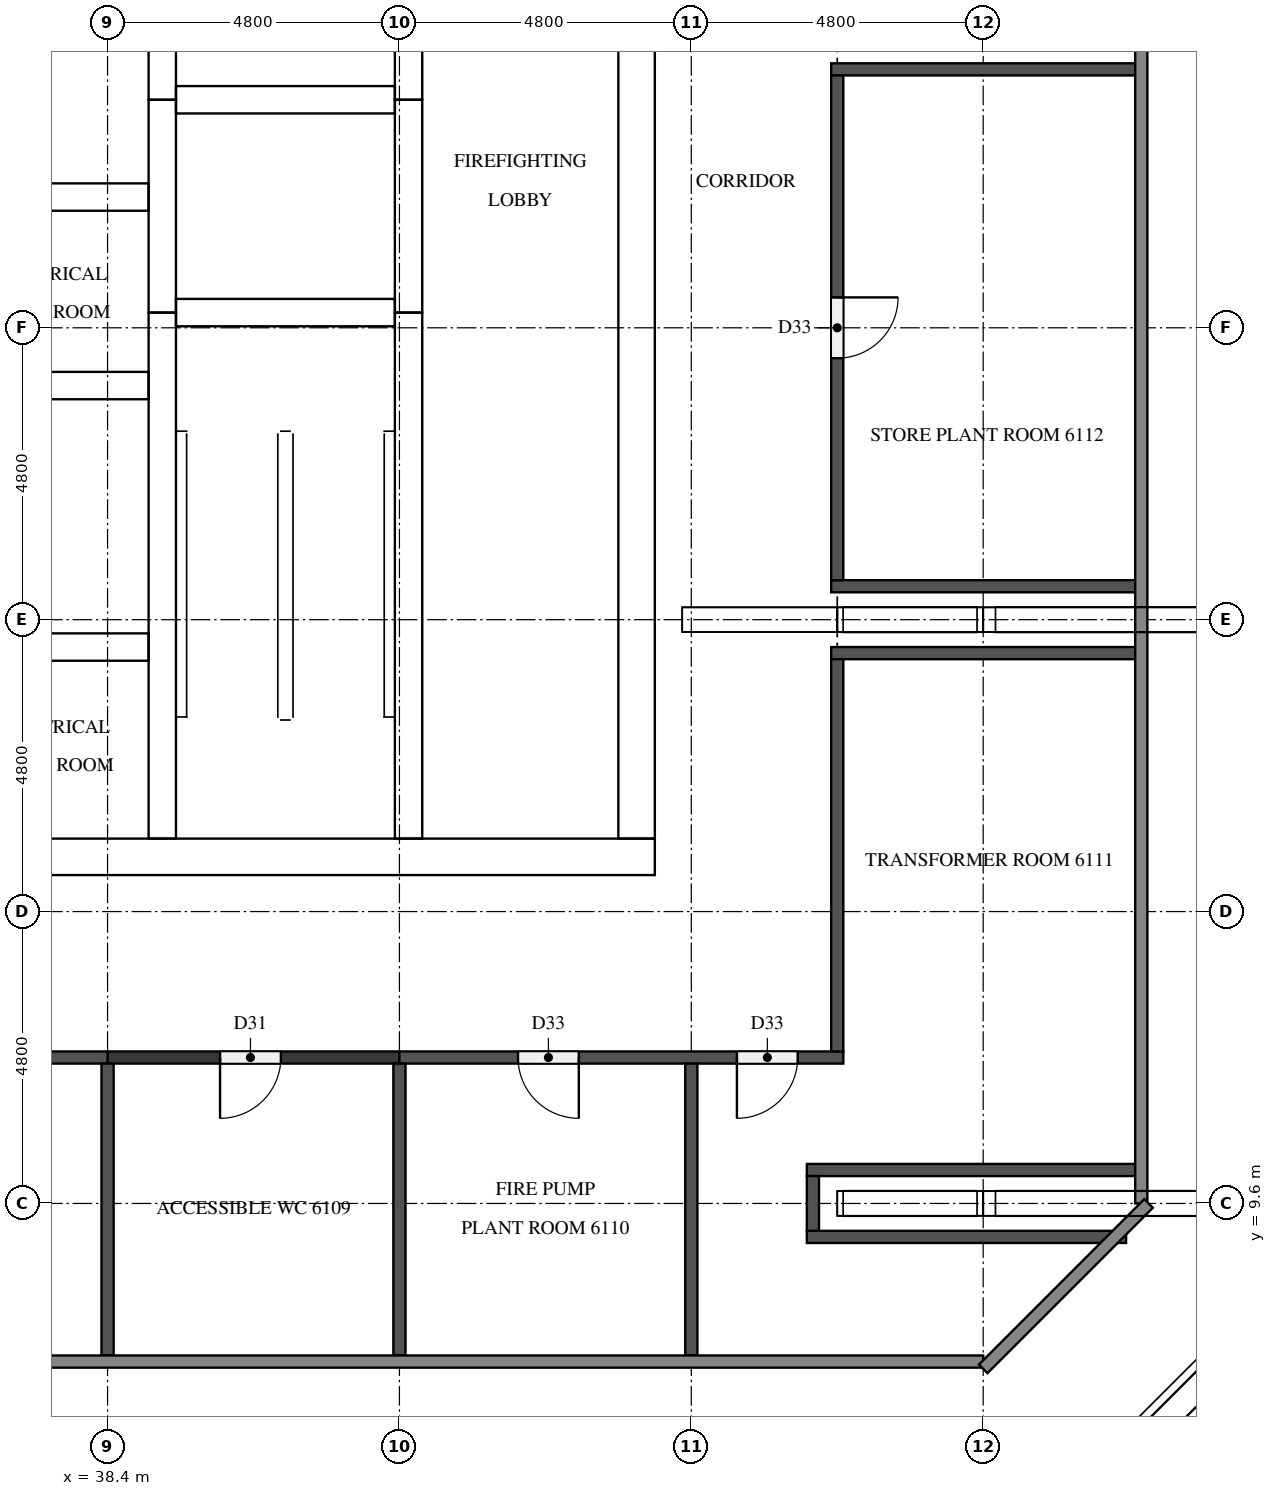
"""IFC4 building model, lengths in metres.
Left out: names, types, materials, properties, quantities, classifications, styles, units other than length and angle.
Written with IfcOpenShell. Run it as: python <this file> out.ifc"""

import sys

from ifc_helpers import new_model, si_unit, direction, frame, frame_2d, origin, place, context, subcontext, project, spatial, rectangle, extrude, element, fill, save


model = new_model("IFC4")
c1 = context("Model", 3, precision=1e-05, world=origin(), true_north=direction((0.0, 1.0)))
c2 = subcontext(c1, "Body", "Model", "MODEL_VIEW")
j1 = project(units=[si_unit("LENGTHUNIT", "METRE"), si_unit("PLANEANGLEUNIT", "RADIAN")], contexts=[c1])
p1 = place(None, origin())
s1 = spatial("IfcSite", under=j1, at=p1, CompositionType="ELEMENT")
p2 = place(p1, origin())
s2 = spatial("IfcBuilding", under=s1, at=p2, CompositionType="ELEMENT")
p3 = place(p2, frame((0.0, 0.0, 233.3)))
s3 = spatial("IfcBuildingStorey", under=s2, at=p3, CompositionType="ELEMENT", Elevation=233.3)
p4 = place(p3, frame((15.0, 15.3, 0.0), z_axis=(0.0, 0.0, 1.0), x_axis=(1.0, 0.0, 0.0)))
e1 = element("IfcWall", 1, at=p4, inside=s3, PredefinedType="SHEAR", context=c2, shape_type="SweptSolid", body=[
    extrude(rectangle(XDim=32.4, YDim=0.6, at=frame_2d((16.2, 0.0))), origin(), (0.0, 0.0, 1.0), 5.1),
])
p5 = place(p4, frame((15.3, 0.0, 0.0)))
e2 = element("IfcOpeningElement", 2, at=p5, cuts=e1, PredefinedType="OPENING", context=c2, shape_type="SweptSolid", body=[
    extrude(rectangle(XDim=1.8, YDim=2.1, at=frame_2d((0.9, 1.05))), frame((0.0, 0.31, 0.0), z_axis=(0.0, -1.0, 0.0), x_axis=(1.0, 0.0, 0.0)), (0.0, 0.0, 1.0), 0.62),
])
p6 = place(p3, frame((47.1, 15.6, 0.0), z_axis=(0.0, 0.0, 1.0), x_axis=(0.0, 1.0, 0.0)))
e3 = element("IfcWall", 3, at=p6, inside=s3, PredefinedType="SHEAR", context=c2, shape_type="SweptSolid", body=[
    extrude(rectangle(XDim=21.6, YDim=0.6, at=frame_2d((10.8, 0.0))), origin(), (0.0, 0.0, 1.0), 5.1),
])
p7 = place(p6, frame((10.5, 0.0, 0.0)))
e4 = element("IfcOpeningElement", 4, at=p7, cuts=e3, PredefinedType="OPENING", context=c2, shape_type="SweptSolid", body=[
    extrude(rectangle(XDim=1.2, YDim=2.1, at=frame_2d((0.6, 1.05))), frame((0.0, 0.31, 0.0), z_axis=(0.0, -1.0, 0.0), x_axis=(1.0, 0.0, 0.0)), (0.0, 0.0, 1.0), 0.62),
])
p8 = place(p3, frame((39.3, 15.6, 0.0), z_axis=(0.0, 0.0, 1.0), x_axis=(0.0, 1.0, 0.0)))
e5 = element("IfcWall", 5, at=p8, inside=s3, PredefinedType="SHEAR", context=c2, shape_type="SweptSolid", body=[
    extrude(rectangle(XDim=8.65, YDim=0.45, at=frame_2d((4.325, 0.0))), origin(), (0.0, 0.0, 1.0), 5.1),
])
p9 = place(p3, frame((39.3, 24.25, 0.0), z_axis=(0.0, 0.0, 1.0), x_axis=(0.0, 1.0, 0.0)))
e6 = element("IfcWall", 6, at=p9, inside=s3, PredefinedType="SHEAR", context=c2, shape_type="SweptSolid", body=[
    extrude(rectangle(XDim=3.5, YDim=0.45, at=frame_2d((1.75, 0.0))), origin(), (0.0, 0.0, 1.0), 5.1),
])
p10 = place(p3, frame((39.3, 27.75, 0.0), z_axis=(0.0, 0.0, 1.0), x_axis=(0.0, 1.0, 0.0)))
e7 = element("IfcWall", 7, at=p10, inside=s3, PredefinedType="SHEAR", context=c2, shape_type="SweptSolid", body=[
    extrude(rectangle(XDim=9.45, YDim=0.45, at=frame_2d((4.725, 0.0))), origin(), (0.0, 0.0, 1.0), 5.1),
])
p11 = place(p3, frame((43.35, 15.6, 0.0), z_axis=(0.0, 0.0, 1.0), x_axis=(0.0, 1.0, 0.0)))
e8 = element("IfcWall", 8, at=p11, inside=s3, PredefinedType="SHEAR", context=c2, shape_type="SweptSolid", body=[
    extrude(rectangle(XDim=8.65, YDim=0.45, at=frame_2d((4.325, 0.0))), origin(), (0.0, 0.0, 1.0), 5.1),
])
p12 = place(p11, frame((0.6, 0.0, 0.0)))
e9 = element("IfcOpeningElement", 9, at=p12, cuts=e8, PredefinedType="OPENING", context=c2, shape_type="SweptSolid", body=[
    extrude(rectangle(XDim=1.2, YDim=2.1, at=frame_2d((0.6, 1.05))), frame((0.0, 0.235, 0.0), z_axis=(0.0, -1.0, 0.0), x_axis=(1.0, 0.0, 0.0)), (0.0, 0.0, 1.0), 0.47),
])
p13 = place(p3, frame((43.35, 24.25, 0.0), z_axis=(0.0, 0.0, 1.0), x_axis=(0.0, 1.0, 0.0)))
e10 = element("IfcWall", 10, at=p13, inside=s3, PredefinedType="SHEAR", context=c2, shape_type="SweptSolid", body=[
    extrude(rectangle(XDim=3.5, YDim=0.45, at=frame_2d((1.75, 0.0))), origin(), (0.0, 0.0, 1.0), 5.1),
])
p14 = place(p13, frame((1.2, 0.0, 0.0)))
e11 = element("IfcOpeningElement", 11, at=p14, cuts=e10, PredefinedType="OPENING", context=c2, shape_type="SweptSolid", body=[
    extrude(rectangle(XDim=1.1, YDim=2.1, at=frame_2d((0.55, 1.05))), frame((0.0, 0.235, 0.0), z_axis=(0.0, -1.0, 0.0), x_axis=(1.0, 0.0, 0.0)), (0.0, 0.0, 1.0), 0.47),
])
p15 = place(p3, frame((43.35, 27.75, 0.0), z_axis=(0.0, 0.0, 1.0), x_axis=(0.0, 1.0, 0.0)))
e12 = element("IfcWall", 12, at=p15, inside=s3, PredefinedType="SHEAR", context=c2, shape_type="SweptSolid", body=[
    extrude(rectangle(XDim=9.45, YDim=0.45, at=frame_2d((4.725, 0.0))), origin(), (0.0, 0.0, 1.0), 5.1),
])
p16 = place(p15, frame((7.65, 0.0, 0.0)))
e13 = element("IfcOpeningElement", 13, at=p16, cuts=e12, PredefinedType="OPENING", context=c2, shape_type="SweptSolid", body=[
    extrude(rectangle(XDim=1.2, YDim=2.1, at=frame_2d((0.6, 1.05))), frame((0.0, 0.235, 0.0), z_axis=(0.0, -1.0, 0.0), x_axis=(1.0, 0.0, 0.0)), (0.0, 0.0, 1.0), 0.47),
])
for number, where, z_axis, x_axis in (
    (14, (39.525, 24.25, 0.0), (0.0, 0.0, 1.0), (1.0, 0.0, 0.0)),
    (15, (39.525, 27.75, 0.0), (0.0, 0.0, 1.0), (1.0, 0.0, 0.0)),
):
    element("IfcWall", number, at=place(p3, frame(where, z_axis=z_axis, x_axis=x_axis)), inside=s3, PredefinedType="SHEAR", context=c2, shape_type="SweptSolid", body=[
        extrude(rectangle(XDim=3.6, YDim=0.45, at=frame_2d((1.8, 0.0))), origin(), (0.0, 0.0, 1.0), 5.1),
    ])
p17 = place(p3, frame((33.475, 18.75, 0.0), z_axis=(0.0, 0.0, 1.0), x_axis=(1.0, 0.0, 0.0)))
e16 = element("IfcWall", 16, at=p17, inside=s3, PredefinedType="SHEAR", context=c2, shape_type="SweptSolid", body=[
    extrude(rectangle(XDim=5.6, YDim=0.45, at=frame_2d((2.8, 0.0))), origin(), (0.0, 0.0, 1.0), 5.1),
])
p18 = place(p17, frame((0.853, 0.0, 0.0)))
e17 = element("IfcOpeningElement", 17, at=p18, cuts=e16, PredefinedType="OPENING", context=c2, shape_type="SweptSolid", body=[
    extrude(rectangle(XDim=1.0, YDim=2.1, at=frame_2d((0.5, 1.05))), frame((0.0, 0.235, 0.0), z_axis=(0.0, -1.0, 0.0), x_axis=(1.0, 0.0, 0.0)), (0.0, 0.0, 1.0), 0.47),
])
p19 = place(p17, frame((3.528, 0.0, 0.0)))
e18 = element("IfcOpeningElement", 18, at=p19, cuts=e16, PredefinedType="OPENING", context=c2, shape_type="SweptSolid", body=[
    extrude(rectangle(XDim=1.0, YDim=2.1, at=frame_2d((0.5, 1.05))), frame((0.0, 0.235, 0.0), z_axis=(0.0, -1.0, 0.0), x_axis=(1.0, 0.0, 0.0)), (0.0, 0.0, 1.0), 0.47),
])
p20 = place(p3, frame((23.325, 23.05, 0.0), z_axis=(0.0, 0.0, 1.0), x_axis=(1.0, 0.0, 0.0)))
e19 = element("IfcWall", 19, at=p20, inside=s3, PredefinedType="SHEAR", context=c2, shape_type="SweptSolid", body=[
    extrude(rectangle(XDim=15.75, YDim=0.45, at=frame_2d((7.875, 0.0))), origin(), (0.0, 0.0, 1.0), 5.1),
])
p21 = place(p20, frame((0.32, 0.0, 0.0)))
e20 = element("IfcOpeningElement", 20, at=p21, cuts=e19, PredefinedType="OPENING", context=c2, shape_type="SweptSolid", body=[
    extrude(rectangle(XDim=1.0, YDim=2.1, at=frame_2d((0.5, 1.05))), frame((0.0, 0.235, 0.0), z_axis=(0.0, -1.0, 0.0), x_axis=(1.0, 0.0, 0.0)), (0.0, 0.0, 1.0), 0.47),
])
p22 = place(p20, frame((2.978, 0.0, 0.0)))
e21 = element("IfcOpeningElement", 21, at=p22, cuts=e19, PredefinedType="OPENING", context=c2, shape_type="SweptSolid", body=[
    extrude(rectangle(XDim=1.0, YDim=2.1, at=frame_2d((0.5, 1.05))), frame((0.0, 0.235, 0.0), z_axis=(0.0, -1.0, 0.0), x_axis=(1.0, 0.0, 0.0)), (0.0, 0.0, 1.0), 0.47),
])
p23 = place(p20, frame((10.953, 0.0, 0.0)))
e22 = element("IfcOpeningElement", 22, at=p23, cuts=e19, PredefinedType="OPENING", context=c2, shape_type="SweptSolid", body=[
    extrude(rectangle(XDim=1.0, YDim=2.1, at=frame_2d((0.5, 1.05))), frame((0.0, 0.235, 0.0), z_axis=(0.0, -1.0, 0.0), x_axis=(1.0, 0.0, 0.0)), (0.0, 0.0, 1.0), 0.47),
])
p24 = place(p20, frame((13.612, 0.0, 0.0)))
e23 = element("IfcOpeningElement", 23, at=p24, cuts=e19, PredefinedType="OPENING", context=c2, shape_type="SweptSolid", body=[
    extrude(rectangle(XDim=1.0, YDim=2.1, at=frame_2d((0.5, 1.05))), frame((0.0, 0.235, 0.0), z_axis=(0.0, -1.0, 0.0), x_axis=(1.0, 0.0, 0.0)), (0.0, 0.0, 1.0), 0.47),
])
p25 = place(p3, frame((23.325, 26.15, 0.0), z_axis=(0.0, 0.0, 1.0), x_axis=(1.0, 0.0, 0.0)))
e24 = element("IfcWall", 24, at=p25, inside=s3, PredefinedType="SHEAR", context=c2, shape_type="SweptSolid", body=[
    extrude(rectangle(XDim=15.75, YDim=0.45, at=frame_2d((7.875, 0.0))), origin(), (0.0, 0.0, 1.0), 5.1),
])
p26 = place(p3, frame((49.9, 9.05, 0.0), z_axis=(0.0, 0.0, 1.0), x_axis=(1.0, 0.0, 0.0)))
e25 = element("IfcWall", 25, at=p26, inside=s3, PredefinedType="PARTITIONING", context=c2, shape_type="SweptSolid", body=[
    extrude(rectangle(XDim=5.25, YDim=0.2, at=frame_2d((2.625, 0.0))), origin(), (0.0, 0.0, 1.0), 5.1),
])
p27 = place(p3, frame((49.9, 10.15, 0.0), z_axis=(0.0, 0.0, 1.0), x_axis=(1.0, 0.0, 0.0)))
e26 = element("IfcWall", 26, at=p27, inside=s3, PredefinedType="PARTITIONING", context=c2, shape_type="SweptSolid", body=[
    extrude(rectangle(XDim=5.4, YDim=0.2, at=frame_2d((2.7, 0.0))), origin(), (0.0, 0.0, 1.0), 5.1),
])
p28 = place(p3, frame((43.2, 12.0, 0.0), z_axis=(0.0, 0.0, 1.0), x_axis=(-1.0, 0.0, 0.0)))
e27 = element("IfcWall", 27, at=p28, inside=s3, PredefinedType="PARTITIONING", context=c2, shape_type="SweptSolid", body=[
    extrude(rectangle(XDim=4.8, YDim=0.2, at=frame_2d((2.4, 0.0))), origin(), (0.0, 0.0, 1.0), 5.1),
])
p29 = place(p28, frame((1.95, 0.0, 0.0)))
e28 = element("IfcOpeningElement", 28, at=p29, cuts=e27, PredefinedType="OPENING", context=c2, shape_type="SweptSolid", body=[
    extrude(rectangle(XDim=1.0, YDim=2.1, at=frame_2d((0.5, 1.05))), frame((0.0, 0.11, 0.0), z_axis=(0.0, -1.0, 0.0), x_axis=(1.0, 0.0, 0.0)), (0.0, 0.0, 1.0), 0.22),
])
p30 = place(p3, frame((38.4, 12.0, 0.0), z_axis=(0.0, 0.0, 1.0), x_axis=(-1.0, 0.0, 0.0)))
e29 = element("IfcWall", 29, at=p30, inside=s3, PredefinedType="PARTITIONING", context=c2, shape_type="SweptSolid", body=[
    extrude(rectangle(XDim=26.5, YDim=0.2, at=frame_2d((13.25, 0.0))), origin(), (0.0, 0.0, 1.0), 5.1),
])
p31 = place(p30, frame((24.75, 0.0, 0.0)))
e30 = element("IfcOpeningElement", 30, at=p31, cuts=e29, PredefinedType="OPENING", context=c2, shape_type="SweptSolid", body=[
    extrude(rectangle(XDim=1.0, YDim=2.1, at=frame_2d((0.5, 1.05))), frame((0.0, 0.11, 0.0), z_axis=(0.0, -1.0, 0.0), x_axis=(1.0, 0.0, 0.0)), (0.0, 0.0, 1.0), 0.22),
])
p32 = place(p30, frame((21.05, 0.0, 0.0)))
e31 = element("IfcOpeningElement", 31, at=p32, cuts=e29, PredefinedType="OPENING", context=c2, shape_type="SweptSolid", body=[
    extrude(rectangle(XDim=1.0, YDim=2.1, at=frame_2d((0.5, 1.05))), frame((0.0, 0.11, 0.0), z_axis=(0.0, -1.0, 0.0), x_axis=(1.0, 0.0, 0.0)), (0.0, 0.0, 1.0), 0.22),
])
p33 = place(p30, frame((13.95, 0.0, 0.0)))
e32 = element("IfcOpeningElement", 32, at=p33, cuts=e29, PredefinedType="OPENING", context=c2, shape_type="SweptSolid", body=[
    extrude(rectangle(XDim=1.0, YDim=2.1, at=frame_2d((0.5, 1.05))), frame((0.0, 0.11, 0.0), z_axis=(0.0, -1.0, 0.0), x_axis=(1.0, 0.0, 0.0)), (0.0, 0.0, 1.0), 0.22),
])
p34 = place(p30, frame((4.25, 0.0, 0.0)))
e33 = element("IfcOpeningElement", 33, at=p34, cuts=e29, PredefinedType="OPENING", context=c2, shape_type="SweptSolid", body=[
    extrude(rectangle(XDim=1.0, YDim=2.1, at=frame_2d((0.5, 1.05))), frame((0.0, 0.11, 0.0), z_axis=(0.0, -1.0, 0.0), x_axis=(1.0, 0.0, 0.0)), (0.0, 0.0, 1.0), 0.22),
])
p35 = place(p3, frame((50.5, 12.0, 0.0), z_axis=(0.0, 0.0, 1.0), x_axis=(-1.0, 0.0, 0.0)))
e34 = element("IfcWall", 34, at=p35, inside=s3, PredefinedType="PARTITIONING", context=c2, shape_type="SweptSolid", body=[
    extrude(rectangle(XDim=7.3, YDim=0.2, at=frame_2d((3.65, 0.0))), origin(), (0.0, 0.0, 1.0), 5.1),
])
p36 = place(p35, frame((4.35, 0.0, 0.0)))
e35 = element("IfcOpeningElement", 35, at=p36, cuts=e34, PredefinedType="OPENING", context=c2, shape_type="SweptSolid", body=[
    extrude(rectangle(XDim=1.0, YDim=2.1, at=frame_2d((0.5, 1.05))), frame((0.0, 0.11, 0.0), z_axis=(0.0, -1.0, 0.0), x_axis=(1.0, 0.0, 0.0)), (0.0, 0.0, 1.0), 0.22),
])
p37 = place(p35, frame((0.75, 0.0, 0.0)))
e36 = element("IfcOpeningElement", 36, at=p37, cuts=e34, PredefinedType="OPENING", context=c2, shape_type="SweptSolid", body=[
    extrude(rectangle(XDim=1.0, YDim=2.1, at=frame_2d((0.5, 1.05))), frame((0.0, 0.11, 0.0), z_axis=(0.0, -1.0, 0.0), x_axis=(1.0, 0.0, 0.0)), (0.0, 0.0, 1.0), 0.22),
])
for number, where, z_axis, x_axis in (
    (37, (50.3, 18.65, 0.0), (0.0, 0.0, 1.0), (1.0, 0.0, 0.0)),
    (38, (50.3, 19.75, 0.0), (0.0, 0.0, 1.0), (1.0, 0.0, 0.0)),
    (39, (50.3, 28.25, 0.0), (0.0, 0.0, 1.0), (1.0, 0.0, 0.0)),
):
    element("IfcWall", number, at=place(p3, frame(where, z_axis=z_axis, x_axis=x_axis)), inside=s3, PredefinedType="PARTITIONING", context=c2, shape_type="SweptSolid", body=[
        extrude(rectangle(XDim=5.0, YDim=0.2, at=frame_2d((2.5, 0.0))), origin(), (0.0, 0.0, 1.0), 5.1),
    ])
for number, where, z_axis, x_axis in (
    (40, (38.4, 7.1, 0.0), (0.0, 0.0, 1.0), (0.0, 1.0, 0.0)),
    (41, (43.2, 7.1, 0.0), (0.0, 0.0, 1.0), (0.0, 1.0, 0.0)),
    (42, (48.0, 7.1, 0.0), (0.0, 0.0, 1.0), (0.0, 1.0, 0.0)),
):
    element("IfcWall", number, at=place(p3, frame(where, z_axis=z_axis, x_axis=x_axis)), inside=s3, PredefinedType="PARTITIONING", context=c2, shape_type="SweptSolid", body=[
        extrude(rectangle(XDim=4.8, YDim=0.2, at=frame_2d((2.4, 0.0))), origin(), (0.0, 0.0, 1.0), 5.1),
    ])
p38 = place(p3, frame((50.0, 9.15, 0.0), z_axis=(0.0, 0.0, 1.0), x_axis=(0.0, 1.0, 0.0)))
e43 = element("IfcWall", 43, at=p38, inside=s3, PredefinedType="PARTITIONING", context=c2, shape_type="SweptSolid", body=[
    extrude(rectangle(XDim=0.9, YDim=0.2, at=frame_2d((0.45, 0.0))), origin(), (0.0, 0.0, 1.0), 5.1),
])
p39 = place(p3, frame((50.4, 12.1, 0.0), z_axis=(0.0, 0.0, 1.0), x_axis=(0.0, 1.0, 0.0)))
e44 = element("IfcWall", 44, at=p39, inside=s3, PredefinedType="PARTITIONING", context=c2, shape_type="SweptSolid", body=[
    extrude(rectangle(XDim=6.45, YDim=0.2, at=frame_2d((3.225, 0.0))), origin(), (0.0, 0.0, 1.0), 5.1),
])
p40 = place(p3, frame((50.4, 28.15, 0.0), z_axis=(0.0, 0.0, 1.0), x_axis=(0.0, -1.0, 0.0)))
e45 = element("IfcWall", 45, at=p40, inside=s3, PredefinedType="PARTITIONING", context=c2, shape_type="SweptSolid", body=[
    extrude(rectangle(XDim=8.3, YDim=0.2, at=frame_2d((4.15, 0.0))), origin(), (0.0, 0.0, 1.0), 5.1),
])
p41 = place(p40, frame((3.65, 0.0, 0.0)))
e46 = element("IfcOpeningElement", 46, at=p41, cuts=e45, PredefinedType="OPENING", context=c2, shape_type="SweptSolid", body=[
    extrude(rectangle(XDim=1.0, YDim=2.1, at=frame_2d((0.5, 1.05))), frame((0.0, 0.11, 0.0), z_axis=(0.0, -1.0, 0.0), x_axis=(1.0, 0.0, 0.0)), (0.0, 0.0, 1.0), 0.22),
])
p42 = place(p14, origin())
e47 = element("IfcDoor", 47, at=p42, inside=s3, OperationType="DOUBLE_DOOR_SLIDING", PredefinedType="DOOR", context=c2, shape_type="SweptSolid", body=[
    extrude(rectangle(XDim=1.1, YDim=2.1, at=frame_2d((0.55, 1.05))), frame((0.0, 0.025, 0.0), z_axis=(0.0, -1.0, 0.0), x_axis=(1.0, 0.0, 0.0)), (0.0, 0.0, 1.0), 0.05),
])
fill(e11, e47)
p43 = place(p12, origin())
e48 = element("IfcDoor", 48, at=p43, inside=s3, OperationType="SINGLE_SWING_RIGHT", PredefinedType="DOOR", context=c2, shape_type="SweptSolid", body=[
    extrude(rectangle(XDim=1.2, YDim=2.1, at=frame_2d((0.6, 1.05))), frame((0.0, 0.025, 0.0), z_axis=(0.0, -1.0, 0.0), x_axis=(1.0, 0.0, 0.0)), (0.0, 0.0, 1.0), 0.05),
])
fill(e9, e48)
p44 = place(p7, origin())
e49 = element("IfcDoor", 49, at=p44, inside=s3, OperationType="SINGLE_SWING_LEFT", PredefinedType="DOOR", context=c2, shape_type="SweptSolid", body=[
    extrude(rectangle(XDim=1.2, YDim=2.1, at=frame_2d((0.6, 1.05))), frame((0.0, 0.025, 0.0), z_axis=(0.0, -1.0, 0.0), x_axis=(1.0, 0.0, 0.0)), (0.0, 0.0, 1.0), 0.05),
])
fill(e4, e49)
p45 = place(p24, frame((1.0, 0.0, 0.0), z_axis=(0.0, 0.0, 1.0), x_axis=(-1.0, 0.0, 0.0)))
e50 = element("IfcDoor", 50, at=p45, inside=s3, OperationType="SINGLE_SWING_LEFT", PredefinedType="DOOR", context=c2, shape_type="SweptSolid", body=[
    extrude(rectangle(XDim=1.0, YDim=2.1, at=frame_2d((0.5, 1.05))), frame((0.0, 0.025, 0.0), z_axis=(0.0, -1.0, 0.0), x_axis=(1.0, 0.0, 0.0)), (0.0, 0.0, 1.0), 0.05),
])
fill(e23, e50)
p46 = place(p19, origin())
e51 = element("IfcDoor", 51, at=p46, inside=s3, OperationType="SINGLE_SWING_LEFT", PredefinedType="DOOR", context=c2, shape_type="SweptSolid", body=[
    extrude(rectangle(XDim=1.0, YDim=2.1, at=frame_2d((0.5, 1.05))), frame((0.0, 0.025, 0.0), z_axis=(0.0, -1.0, 0.0), x_axis=(1.0, 0.0, 0.0)), (0.0, 0.0, 1.0), 0.05),
])
fill(e18, e51)
p47 = place(p29, origin())
e52 = element("IfcDoor", 52, at=p47, inside=s3, OperationType="SINGLE_SWING_RIGHT", PredefinedType="DOOR", context=c2, shape_type="SweptSolid", body=[
    extrude(rectangle(XDim=1.0, YDim=2.1, at=frame_2d((0.5, 1.05))), frame((0.0, 0.025, 0.0), z_axis=(0.0, -1.0, 0.0), x_axis=(1.0, 0.0, 0.0)), (0.0, 0.0, 1.0), 0.05),
])
fill(e28, e52)
p48 = place(p36, origin())
e53 = element("IfcDoor", 53, at=p48, inside=s3, OperationType="SINGLE_SWING_LEFT", PredefinedType="DOOR", context=c2, shape_type="SweptSolid", body=[
    extrude(rectangle(XDim=1.0, YDim=2.1, at=frame_2d((0.5, 1.05))), frame((0.0, 0.025, 0.0), z_axis=(0.0, -1.0, 0.0), x_axis=(1.0, 0.0, 0.0)), (0.0, 0.0, 1.0), 0.05),
])
fill(e35, e53)
p49 = place(p37, origin())
e54 = element("IfcDoor", 54, at=p49, inside=s3, OperationType="SINGLE_SWING_RIGHT", PredefinedType="DOOR", context=c2, shape_type="SweptSolid", body=[
    extrude(rectangle(XDim=1.0, YDim=2.1, at=frame_2d((0.5, 1.05))), frame((0.0, 0.025, 0.0), z_axis=(0.0, -1.0, 0.0), x_axis=(1.0, 0.0, 0.0)), (0.0, 0.0, 1.0), 0.05),
])
fill(e36, e54)
p50 = place(p41, origin())
e55 = element("IfcDoor", 55, at=p50, inside=s3, OperationType="SINGLE_SWING_LEFT", PredefinedType="DOOR", context=c2, shape_type="SweptSolid", body=[
    extrude(rectangle(XDim=1.0, YDim=2.1, at=frame_2d((0.5, 1.05))), frame((0.0, 0.025, 0.0), z_axis=(0.0, -1.0, 0.0), x_axis=(1.0, 0.0, 0.0)), (0.0, 0.0, 1.0), 0.05),
])
fill(e46, e55)
save(model, sys.argv[1])
